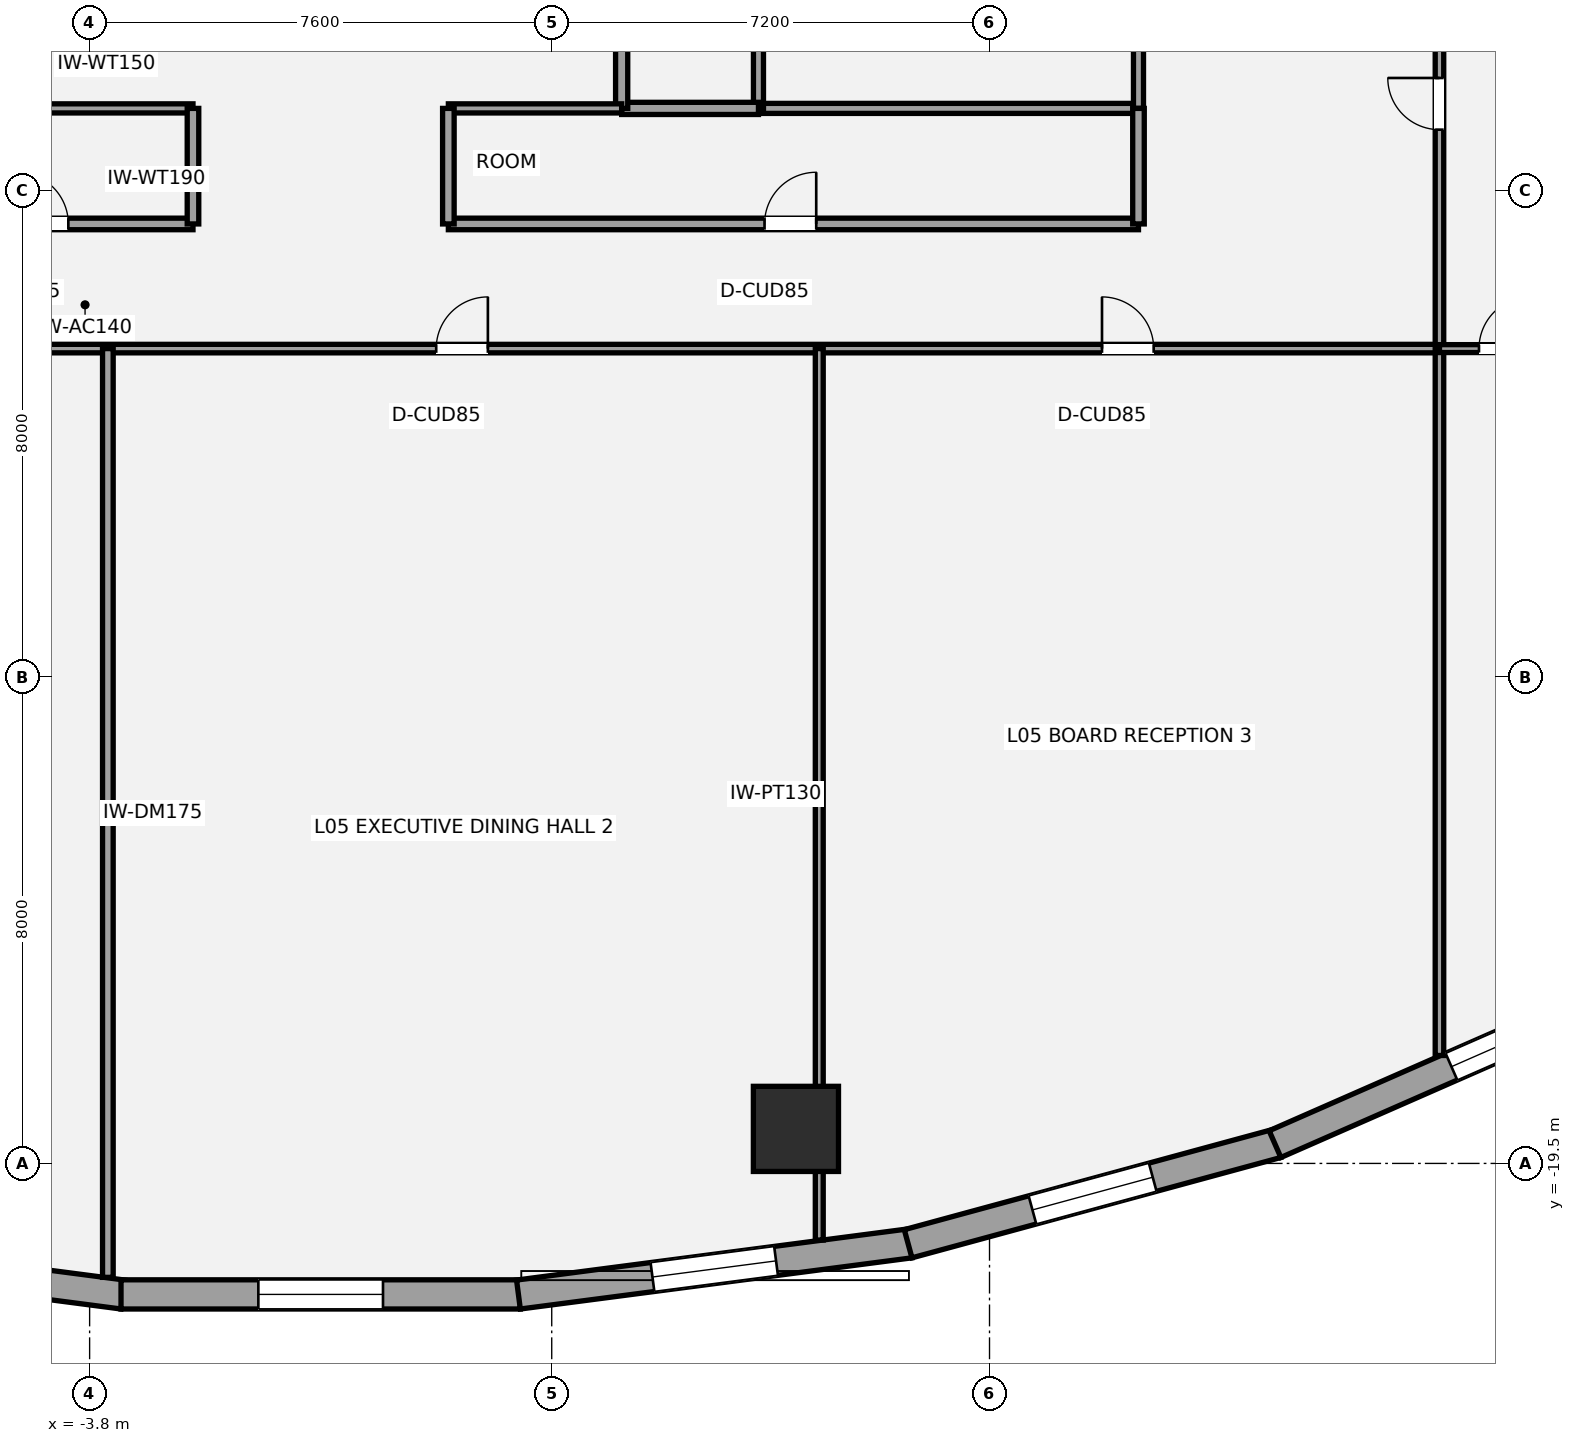
"""IFC4 building model, lengths in metres.
Left out: names, types, materials, properties, quantities, classifications, styles, units other than length and angle.
Written with IfcOpenShell. Run it as: python <this file> out.ifc"""

import sys

from ifc_helpers import new_model, si_unit, direction, frame, frame_2d, origin, origin_2d, place, context, subcontext, project, spatial, rectangle, hollow_circle, extrude, element, fill, save


model = new_model("IFC4")
c1 = context("Model", 3, precision=1e-05, world=origin(), true_north=direction((0.0, 1.0)))
c2 = subcontext(c1, "Body", "Model", "MODEL_VIEW")
j1 = project(units=[si_unit("LENGTHUNIT", "METRE"), si_unit("PLANEANGLEUNIT", "RADIAN")], contexts=[c1])
p1 = place(None, origin())
s1 = spatial("IfcSite", under=j1, at=p1, CompositionType="ELEMENT")
p2 = place(p1, origin())
s2 = spatial("IfcBuilding", under=s1, at=p2, CompositionType="ELEMENT")
p3 = place(p2, frame((0.0, 0.0, 22.8)))
s3 = spatial("IfcBuildingStorey", under=s2, at=p3, CompositionType="ELEMENT", Elevation=22.8)
p4 = place(p3, frame((7.816, -18.932, 0.0), z_axis=(0.0, 0.0, 1.0), x_axis=(1.0, 0.0, 0.0)))
e1 = element("IfcColumn", 1, at=p4, inside=s3, PredefinedType="USERDEFINED", context=c2, shape_type="SweptSolid", body=[
    extrude(hollow_circle(Radius=0.7, WallThickness=0.05, at=origin_2d()), origin(), (0.0, 0.0, 1.0), 4.13),
])
p5 = place(p3, frame((-3.252, -21.656, 0.0), z_axis=(0.0, 0.0, 1.0), x_axis=(-0.991576921472, 0.129519144545, 0.0)))
e2 = element("IfcWall", 2, at=p5, inside=s3, PredefinedType="STANDARD", context=c2, shape_type="SweptSolid", body=[
    extrude(rectangle(XDim=6.496, YDim=0.48, at=frame_2d((3.248, 0.0))), origin(), (0.0, 0.0, 1.0), 3.033),
])
p6 = place(p5, frame((2.223, 0.0, 0.72)))
e3 = element("IfcOpeningElement", 3, at=p6, cuts=e2, PredefinedType="OPENING", context=c2, shape_type="SweptSolid", body=[
    extrude(rectangle(XDim=2.05, YDim=1.8, at=frame_2d((1.025, 0.9))), frame((0.0, 0.25, 0.0), z_axis=(0.0, -1.0, 0.0), x_axis=(1.0, 0.0, 0.0)), (0.0, 0.0, 1.0), 0.5),
])
p7 = place(p3, frame((3.284, -21.654, 0.0), z_axis=(0.0, 0.0, 1.0), x_axis=(-1.0, 0.0, 0.0)))
e4 = element("IfcWall", 4, at=p7, inside=s3, PredefinedType="STANDARD", context=c2, shape_type="SweptSolid", body=[
    extrude(rectangle(XDim=6.567, YDim=0.48, at=frame_2d((3.284, 0.0))), origin(), (0.0, 0.0, 1.0), 3.033),
])
p8 = place(p7, frame((2.259, 0.0, 0.72)))
e5 = element("IfcOpeningElement", 5, at=p8, cuts=e4, PredefinedType="OPENING", context=c2, shape_type="SweptSolid", body=[
    extrude(rectangle(XDim=2.05, YDim=1.8, at=frame_2d((1.025, 0.9))), frame((0.0, 0.25, 0.0), z_axis=(0.0, -1.0, 0.0), x_axis=(1.0, 0.0, 0.0)), (0.0, 0.0, 1.0), 0.5),
])
p9 = place(p3, frame((9.693, -20.815, 0.0), z_axis=(0.0, 0.0, 1.0), x_axis=(-0.991576921472, -0.129519144545, 0.0)))
e6 = element("IfcWall", 6, at=p9, inside=s3, PredefinedType="STANDARD", context=c2, shape_type="SweptSolid", body=[
    extrude(rectangle(XDim=6.496, YDim=0.48, at=frame_2d((3.248, 0.0))), origin(), (0.0, 0.0, 1.0), 3.033),
])
p10 = place(p9, frame((2.223, 0.0, 0.72)))
e7 = element("IfcOpeningElement", 7, at=p10, cuts=e6, PredefinedType="OPENING", context=c2, shape_type="SweptSolid", body=[
    extrude(rectangle(XDim=2.05, YDim=1.8, at=frame_2d((1.025, 0.9))), frame((0.0, 0.25, 0.0), z_axis=(0.0, -1.0, 0.0), x_axis=(1.0, 0.0, 0.0)), (0.0, 0.0, 1.0), 0.5),
])
p11 = place(p3, frame((15.729, -19.171, 0.0), z_axis=(0.0, 0.0, 1.0), x_axis=(-0.964936550718, -0.262483243445, 0.0)))
e8 = element("IfcWall", 8, at=p11, inside=s3, PredefinedType="STANDARD", context=c2, shape_type="SweptSolid", body=[
    extrude(rectangle(XDim=6.288, YDim=0.48, at=frame_2d((3.144, 0.0))), origin(), (0.0, 0.0, 1.0), 3.033),
])
p12 = place(p11, frame((2.119, 0.0, 0.72)))
e9 = element("IfcOpeningElement", 9, at=p12, cuts=e8, PredefinedType="OPENING", context=c2, shape_type="SweptSolid", body=[
    extrude(rectangle(XDim=2.05, YDim=1.8, at=frame_2d((1.025, 0.9))), frame((0.0, 0.25, 0.0), z_axis=(0.0, -1.0, 0.0), x_axis=(1.0, 0.0, 0.0)), (0.0, 0.0, 1.0), 0.5),
])
p13 = place(p3, frame((21.156, -16.786, 0.0), z_axis=(0.0, 0.0, 1.0), x_axis=(-0.91570760638, -0.401845218484, 0.0)))
e10 = element("IfcWall", 10, at=p13, inside=s3, PredefinedType="STANDARD", context=c2, shape_type="SweptSolid", body=[
    extrude(rectangle(XDim=5.963, YDim=0.48, at=frame_2d((2.981, 0.0))), origin(), (0.0, 0.0, 1.0), 3.033),
])
p14 = place(p13, frame((0.744, 0.0, 0.72)))
e11 = element("IfcOpeningElement", 11, at=p14, cuts=e10, PredefinedType="OPENING", context=c2, shape_type="SweptSolid", body=[
    extrude(rectangle(XDim=2.05, YDim=1.8, at=frame_2d((1.025, 0.9))), frame((0.0, 0.25, 0.0), z_axis=(0.0, -1.0, 0.0), x_axis=(1.0, 0.0, 0.0)), (0.0, 0.0, 1.0), 0.5),
])
p15 = place(p3, frame((7.2, -2.15, 0.0), z_axis=(0.0, 0.0, 1.0), x_axis=(1.0, 0.0, 0.0)))
e12 = element("IfcWall", 12, at=p15, inside=s3, PredefinedType="PARTITIONING", context=c2, shape_type="SweptSolid", body=[
    extrude(rectangle(XDim=6.25, YDim=0.165, at=frame_2d((3.125, 0.0))), origin(), (0.0, 0.0, 1.0), 3.9),
])
p16 = place(p3, frame((7.2, -2.15, 0.0), z_axis=(0.0, 0.0, 1.0), x_axis=(0.0, 1.0, 0.0)))
e13 = element("IfcWall", 13, at=p16, inside=s3, PredefinedType="PARTITIONING", context=c2, shape_type="SweptSolid", body=[
    extrude(rectangle(XDim=3.15, YDim=0.165, at=frame_2d((1.575, 0.0))), origin(), (0.0, 0.0, 1.0), 3.9),
])
p17 = place(p3, frame((13.45, -2.15, 0.0), z_axis=(0.0, 0.0, 1.0), x_axis=(0.0, 1.0, 0.0)))
e14 = element("IfcWall", 14, at=p17, inside=s3, PredefinedType="PARTITIONING", context=c2, shape_type="SweptSolid", body=[
    extrude(rectangle(XDim=3.15, YDim=0.165, at=frame_2d((1.575, 0.0))), origin(), (0.0, 0.0, 1.0), 2.09),
])
p18 = place(p17, frame((1.15, 0.0, 0.0)))
e15 = element("IfcOpeningElement", 15, at=p18, cuts=e14, PredefinedType="OPENING", context=c2, shape_type="SweptSolid", body=[
    extrude(rectangle(XDim=0.85, YDim=2.0, at=frame_2d((0.425, 1.0))), frame((0.0, 0.093, 0.0), z_axis=(0.0, -1.0, 0.0), x_axis=(1.0, 0.0, 0.0)), (0.0, 0.0, 1.0), 0.185),
])
p19 = place(p3, frame((4.95, -2.15, 0.0), z_axis=(0.0, 0.0, 1.0), x_axis=(1.0, 0.0, 0.0)))
e16 = element("IfcWall", 16, at=p19, inside=s3, PredefinedType="SOLIDWALL", context=c2, shape_type="SweptSolid", body=[
    extrude(rectangle(XDim=2.25, YDim=0.2, at=frame_2d((1.125, 0.0))), origin(), (0.0, 0.0, 1.0), 2.09),
])
p20 = place(p3, frame((4.95, -2.15, 0.0), z_axis=(0.0, 0.0, 1.0), x_axis=(0.0, 1.0, 0.0)))
e17 = element("IfcWall", 17, at=p20, inside=s3, PredefinedType="SOLIDWALL", context=c2, shape_type="SweptSolid", body=[
    extrude(rectangle(XDim=3.15, YDim=0.2, at=frame_2d((1.575, 0.0))), origin(), (0.0, 0.0, 1.0), 2.09),
])
p21 = place(p20, frame((0.95, 0.0, 0.0)))
e18 = element("IfcOpeningElement", 18, at=p21, cuts=e17, PredefinedType="OPENING", context=c2, shape_type="SweptSolid", body=[
    extrude(rectangle(XDim=0.85, YDim=2.0, at=frame_2d((0.425, 1.0))), frame((0.0, 0.11, 0.0), z_axis=(0.0, -1.0, 0.0), x_axis=(1.0, 0.0, 0.0)), (0.0, 0.0, 1.0), 0.22),
])
p22 = place(p3, frame((-6.8, -4.05, 0.0), z_axis=(0.0, 0.0, 1.0), x_axis=(1.0, 0.0, 0.0)))
e19 = element("IfcWall", 19, at=p22, inside=s3, PredefinedType="PLUMBINGWALL", context=c2, shape_type="SweptSolid", body=[
    extrude(rectangle(XDim=4.7, YDim=0.19, at=frame_2d((2.35, 0.0))), origin(), (0.0, 0.0, 1.0), 2.09),
])
p23 = place(p22, frame((1.8, 0.0, 0.0)))
e20 = element("IfcOpeningElement", 20, at=p23, cuts=e19, PredefinedType="OPENING", context=c2, shape_type="SweptSolid", body=[
    extrude(rectangle(XDim=0.85, YDim=2.0, at=frame_2d((0.425, 1.0))), frame((0.0, 0.105, 0.0), z_axis=(0.0, -1.0, 0.0), x_axis=(1.0, 0.0, 0.0)), (0.0, 0.0, 1.0), 0.21),
])
p24 = place(p3, frame((-4.95, -2.15, 0.0), z_axis=(0.0, 0.0, 1.0), x_axis=(1.0, 0.0, 0.0)))
e21 = element("IfcWall", 21, at=p24, inside=s3, PredefinedType="PLUMBINGWALL", context=c2, shape_type="SweptSolid", body=[
    extrude(rectangle(XDim=2.85, YDim=0.15, at=frame_2d((1.425, 0.0))), origin(), (0.0, 0.0, 1.0), 3.9),
])
p25 = place(p3, frame((-2.1, -4.05, 0.0), z_axis=(0.0, 0.0, 1.0), x_axis=(0.0, 1.0, 0.0)))
e22 = element("IfcWall", 22, at=p25, inside=s3, PredefinedType="PLUMBINGWALL", context=c2, shape_type="SweptSolid", body=[
    extrude(rectangle(XDim=1.9, YDim=0.19, at=frame_2d((0.95, 0.0))), origin(), (0.0, 0.0, 1.0), 3.9),
])
p26 = place(p3, frame((2.1, -4.05, 0.0), z_axis=(0.0, 0.0, 1.0), x_axis=(1.0, 0.0, 0.0)))
e23 = element("IfcWall", 23, at=p26, inside=s3, PredefinedType="PLUMBINGWALL", context=c2, shape_type="SweptSolid", body=[
    extrude(rectangle(XDim=11.35, YDim=0.19, at=frame_2d((5.675, 0.0))), origin(), (0.0, 0.0, 1.0), 2.09),
])
p27 = place(p26, frame((5.2, 0.0, 0.0)))
e24 = element("IfcOpeningElement", 24, at=p27, cuts=e23, PredefinedType="OPENING", context=c2, shape_type="SweptSolid", body=[
    extrude(rectangle(XDim=0.85, YDim=2.0, at=frame_2d((0.425, 1.0))), frame((0.0, 0.105, 0.0), z_axis=(0.0, -1.0, 0.0), x_axis=(1.0, 0.0, 0.0)), (0.0, 0.0, 1.0), 0.21),
])
p28 = place(p3, frame((2.1, -2.15, 0.0), z_axis=(0.0, 0.0, 1.0), x_axis=(1.0, 0.0, 0.0)))
e25 = element("IfcWall", 25, at=p28, inside=s3, PredefinedType="PLUMBINGWALL", context=c2, shape_type="SweptSolid", body=[
    extrude(rectangle(XDim=2.85, YDim=0.15, at=frame_2d((1.425, 0.0))), origin(), (0.0, 0.0, 1.0), 3.9),
])
p29 = place(p3, frame((2.1, -4.05, 0.0), z_axis=(0.0, 0.0, 1.0), x_axis=(0.0, 1.0, 0.0)))
e26 = element("IfcWall", 26, at=p29, inside=s3, PredefinedType="PLUMBINGWALL", context=c2, shape_type="SweptSolid", body=[
    extrude(rectangle(XDim=1.9, YDim=0.19, at=frame_2d((0.95, 0.0))), origin(), (0.0, 0.0, 1.0), 3.9),
])
p30 = place(p3, frame((13.45, -4.05, 0.0), z_axis=(0.0, 0.0, 1.0), x_axis=(0.0, 1.0, 0.0)))
e27 = element("IfcWall", 27, at=p30, inside=s3, PredefinedType="PLUMBINGWALL", context=c2, shape_type="SweptSolid", body=[
    extrude(rectangle(XDim=1.9, YDim=0.19, at=frame_2d((0.95, 0.0))), origin(), (0.0, 0.0, 1.0), 3.353),
])
p31 = place(p3, frame((-16.0, -6.1, 0.0), z_axis=(0.0, 0.0, 1.0), x_axis=(1.0, 0.0, 0.0)))
e28 = element("IfcWall", 28, at=p31, inside=s3, PredefinedType="PARTITIONING", context=c2, shape_type="SweptSolid", body=[
    extrude(rectangle(XDim=34.4, YDim=0.14, at=frame_2d((17.2, 0.0))), origin(), (0.0, 0.0, 1.0), 2.09),
])
p32 = place(p31, frame((5.5, 0.0, 0.0)))
e29 = element("IfcOpeningElement", 29, at=p32, cuts=e28, PredefinedType="OPENING", context=c2, shape_type="SweptSolid", body=[
    extrude(rectangle(XDim=0.85, YDim=2.0, at=frame_2d((0.425, 1.0))), frame((0.0, 0.08, 0.0), z_axis=(0.0, -1.0, 0.0), x_axis=(1.0, 0.0, 0.0)), (0.0, 0.0, 1.0), 0.16),
])
p33 = place(p31, frame((17.9, 0.0, 0.0)))
e30 = element("IfcOpeningElement", 30, at=p33, cuts=e28, PredefinedType="OPENING", context=c2, shape_type="SweptSolid", body=[
    extrude(rectangle(XDim=0.85, YDim=2.0, at=frame_2d((0.425, 1.0))), frame((0.0, 0.08, 0.0), z_axis=(0.0, -1.0, 0.0), x_axis=(1.0, 0.0, 0.0)), (0.0, 0.0, 1.0), 0.16),
])
p34 = place(p31, frame((28.85, 0.0, 0.0)))
e31 = element("IfcOpeningElement", 31, at=p34, cuts=e28, PredefinedType="OPENING", context=c2, shape_type="SweptSolid", body=[
    extrude(rectangle(XDim=0.85, YDim=2.0, at=frame_2d((0.425, 1.0))), frame((0.0, 0.08, 0.0), z_axis=(0.0, -1.0, 0.0), x_axis=(1.0, 0.0, 0.0)), (0.0, 0.0, 1.0), 0.16),
])
p35 = place(p3, frame((18.4, -17.725, 0.0), z_axis=(0.0, 0.0, 1.0), x_axis=(0.0, 1.0, 0.0)))
e32 = element("IfcWall", 32, at=p35, inside=s3, PredefinedType="PARTITIONING", context=c2, shape_type="SweptSolid", body=[
    extrude(rectangle(XDim=25.275, YDim=0.14, at=frame_2d((12.637, 0.0))), origin(), (0.0, 0.0, 1.0), 2.09),
])
p36 = place(p35, frame((15.225, 0.0, 0.0)))
e33 = element("IfcOpeningElement", 33, at=p36, cuts=e32, PredefinedType="OPENING", context=c2, shape_type="SweptSolid", body=[
    extrude(rectangle(XDim=0.85, YDim=2.0, at=frame_2d((0.425, 1.0))), frame((0.0, 0.08, 0.0), z_axis=(0.0, -1.0, 0.0), x_axis=(1.0, 0.0, 0.0)), (0.0, 0.0, 1.0), 0.16),
])
p37 = place(p35, frame((22.05, 0.0, 0.0)))
e34 = element("IfcOpeningElement", 34, at=p37, cuts=e32, PredefinedType="OPENING", context=c2, shape_type="SweptSolid", body=[
    extrude(rectangle(XDim=0.85, YDim=2.0, at=frame_2d((0.425, 1.0))), frame((0.0, 0.08, 0.0), z_axis=(0.0, -1.0, 0.0), x_axis=(1.0, 0.0, 0.0)), (0.0, 0.0, 1.0), 0.16),
])
p38 = place(p3, frame((-3.5, -21.374, 0.0), z_axis=(0.0, 0.0, 1.0), x_axis=(0.0, 1.0, 0.0)))
e35 = element("IfcWall", 35, at=p38, inside=s3, PredefinedType="PARTITIONING", context=c2, shape_type="SweptSolid", body=[
    extrude(rectangle(XDim=15.274, YDim=0.175, at=frame_2d((7.637, 0.0))), origin(), (0.0, 0.0, 1.0), 2.09),
])
p39 = place(p3, frame((8.2, -20.76, 0.0), z_axis=(0.0, 0.0, 1.0), x_axis=(0.0, 1.0, 0.0)))
e36 = element("IfcWall", 36, at=p39, inside=s3, PredefinedType="PARTITIONING", context=c2, shape_type="SweptSolid", body=[
    extrude(rectangle(XDim=14.66, YDim=0.13, at=frame_2d((7.33, 0.0))), origin(), (0.0, 0.0, 1.0), 2.09),
])
p40 = place(p3, frame((18.4, -6.1, 0.0), z_axis=(0.0, 0.0, 1.0), x_axis=(1.0, 0.0, 0.0)))
e37 = element("IfcWall", 37, at=p40, inside=s3, PredefinedType="PARTITIONING", context=c2, shape_type="SweptSolid", body=[
    extrude(rectangle(XDim=13.234, YDim=0.13, at=frame_2d((6.617, 0.0))), origin(), (0.0, 0.0, 1.0), 2.09),
])
p41 = place(p40, frame((0.65, 0.0, 0.0)))
e38 = element("IfcOpeningElement", 38, at=p41, cuts=e37, PredefinedType="OPENING", context=c2, shape_type="SweptSolid", body=[
    extrude(rectangle(XDim=0.85, YDim=2.0, at=frame_2d((0.425, 1.0))), frame((0.0, 0.075, 0.0), z_axis=(0.0, -1.0, 0.0), x_axis=(1.0, 0.0, 0.0)), (0.0, 0.0, 1.0), 0.15),
])
p42 = place(p8, origin())
e39 = element("IfcWindow", 39, at=p42, inside=s3, PartitioningType="SINGLE_PANEL", PredefinedType="WINDOW", context=c2, shape_type="SweptSolid", body=[
    extrude(rectangle(XDim=2.05, YDim=1.8, at=frame_2d((1.025, 0.9))), frame((0.0, -0.01, 0.0), z_axis=(0.0, -1.0, 0.0), x_axis=(1.0, 0.0, 0.0)), (0.0, 0.0, 1.0), 0.06),
])
fill(e5, e39)
p43 = place(p10, origin())
e40 = element("IfcWindow", 40, at=p43, inside=s3, PartitioningType="SINGLE_PANEL", PredefinedType="WINDOW", context=c2, shape_type="SweptSolid", body=[
    extrude(rectangle(XDim=2.05, YDim=1.8, at=frame_2d((1.025, 0.9))), frame((0.0, -0.01, 0.0), z_axis=(0.0, -1.0, 0.0), x_axis=(1.0, 0.0, 0.0)), (0.0, 0.0, 1.0), 0.06),
])
fill(e7, e40)
p44 = place(p12, origin())
e41 = element("IfcWindow", 41, at=p44, inside=s3, PartitioningType="SINGLE_PANEL", PredefinedType="WINDOW", context=c2, shape_type="SweptSolid", body=[
    extrude(rectangle(XDim=2.05, YDim=1.8, at=frame_2d((1.025, 0.9))), frame((0.0, -0.01, 0.0), z_axis=(0.0, -1.0, 0.0), x_axis=(1.0, 0.0, 0.0)), (0.0, 0.0, 1.0), 0.06),
])
fill(e9, e41)
p45 = place(p14, origin())
e42 = element("IfcWindow", 42, at=p45, inside=s3, PartitioningType="SINGLE_PANEL", PredefinedType="WINDOW", context=c2, shape_type="SweptSolid", body=[
    extrude(rectangle(XDim=2.05, YDim=1.8, at=frame_2d((1.025, 0.9))), frame((0.0, -0.01, 0.0), z_axis=(0.0, -1.0, 0.0), x_axis=(1.0, 0.0, 0.0)), (0.0, 0.0, 1.0), 0.06),
])
fill(e11, e42)
p46 = place(p23, origin())
e43 = element("IfcDoor", 43, at=p46, inside=s3, OperationType="SINGLE_SWING_LEFT", PredefinedType="DOOR", context=c2, shape_type="SweptSolid", body=[
    extrude(rectangle(XDim=0.85, YDim=2.0, at=frame_2d((0.425, 1.0))), frame((0.0, 0.025, 0.0), z_axis=(0.0, -1.0, 0.0), x_axis=(1.0, 0.0, 0.0)), (0.0, 0.0, 1.0), 0.05),
])
fill(e20, e43)
p47 = place(p27, origin())
e44 = element("IfcDoor", 44, at=p47, inside=s3, OperationType="SINGLE_SWING_RIGHT", PredefinedType="DOOR", context=c2, shape_type="SweptSolid", body=[
    extrude(rectangle(XDim=0.85, YDim=2.0, at=frame_2d((0.425, 1.0))), frame((0.0, 0.025, 0.0), z_axis=(0.0, -1.0, 0.0), x_axis=(1.0, 0.0, 0.0)), (0.0, 0.0, 1.0), 0.05),
])
fill(e24, e44)
p48 = place(p33, origin())
e45 = element("IfcDoor", 45, at=p48, inside=s3, OperationType="SINGLE_SWING_RIGHT", PredefinedType="DOOR", context=c2, shape_type="SweptSolid", body=[
    extrude(rectangle(XDim=0.85, YDim=2.0, at=frame_2d((0.425, 1.0))), frame((0.0, 0.025, 0.0), z_axis=(0.0, -1.0, 0.0), x_axis=(1.0, 0.0, 0.0)), (0.0, 0.0, 1.0), 0.05),
])
fill(e30, e45)
p49 = place(p34, origin())
e46 = element("IfcDoor", 46, at=p49, inside=s3, OperationType="SINGLE_SWING_LEFT", PredefinedType="DOOR", context=c2, shape_type="SweptSolid", body=[
    extrude(rectangle(XDim=0.85, YDim=2.0, at=frame_2d((0.425, 1.0))), frame((0.0, 0.025, 0.0), z_axis=(0.0, -1.0, 0.0), x_axis=(1.0, 0.0, 0.0)), (0.0, 0.0, 1.0), 0.05),
])
fill(e31, e46)
p50 = place(p41, origin())
e47 = element("IfcDoor", 47, at=p50, inside=s3, OperationType="SINGLE_SWING_RIGHT", PredefinedType="DOOR", context=c2, shape_type="SweptSolid", body=[
    extrude(rectangle(XDim=0.85, YDim=2.0, at=frame_2d((0.425, 1.0))), frame((0.0, 0.025, 0.0), z_axis=(0.0, -1.0, 0.0), x_axis=(1.0, 0.0, 0.0)), (0.0, 0.0, 1.0), 0.05),
])
fill(e38, e47)
p51 = place(p36, origin())
e48 = element("IfcDoor", 48, at=p51, inside=s3, OperationType="SINGLE_SWING_RIGHT", PredefinedType="DOOR", context=c2, shape_type="SweptSolid", body=[
    extrude(rectangle(XDim=0.85, YDim=2.0, at=frame_2d((0.425, 1.0))), frame((0.0, 0.025, 0.0), z_axis=(0.0, -1.0, 0.0), x_axis=(1.0, 0.0, 0.0)), (0.0, 0.0, 1.0), 0.05),
])
fill(e33, e48)
save(model, sys.argv[1])
